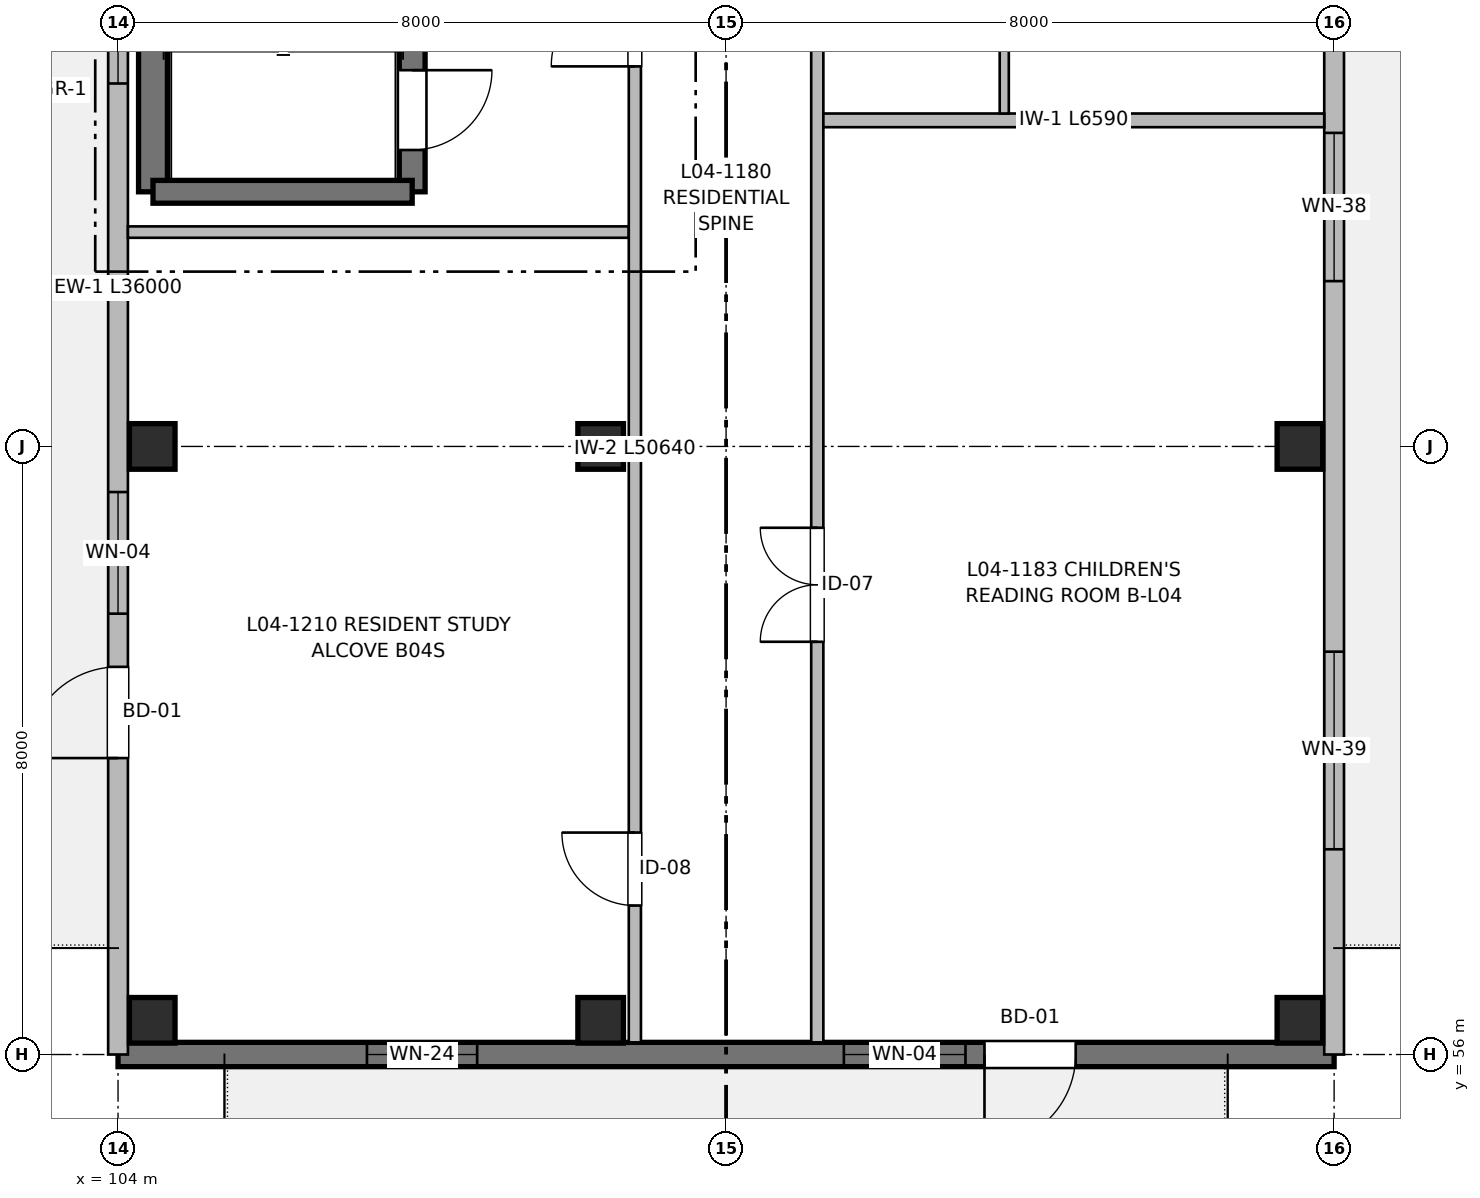
"""IFC4 building model, lengths in metres.
Left out: names, types, materials, properties, quantities, classifications, styles, units other than length and angle.
Written with IfcOpenShell. Run it as: python <this file> out.ifc"""

import sys

from ifc_helpers import new_model, si_unit, direction, frame, frame_2d, origin, origin_2d, place, context, subcontext, project, spatial, rectangle, extrude, element, fill, save


model = new_model("IFC4")
c1 = context("Model", 3, precision=1e-05, world=origin(), true_north=direction((0.0, 1.0)))
c2 = subcontext(c1, "Body", "Model", "MODEL_VIEW")
j1 = project(units=[si_unit("LENGTHUNIT", "METRE"), si_unit("PLANEANGLEUNIT", "RADIAN")], contexts=[c1])
p1 = place(None, origin())
s1 = spatial("IfcSite", under=j1, at=p1, CompositionType="ELEMENT")
p2 = place(p1, origin())
s2 = spatial("IfcBuilding", under=s1, at=p2, CompositionType="ELEMENT")
p3 = place(p2, frame((0.0, 0.0, 13.76)))
s3 = spatial("IfcBuildingStorey", under=s2, at=p3, CompositionType="ELEMENT", Elevation=13.76)
for number, where, z_axis, x_axis in (
    (1, (104.45, 56.45, 0.0), (0.0, 0.0, 1.0), (1.0, 0.0, 0.0)),
    (2, (104.45, 64.0, 0.0), (0.0, 0.0, 1.0), (1.0, 0.0, 0.0)),
    (3, (110.35, 56.45, 0.0), (0.0, 0.0, 1.0), (1.0, 0.0, 0.0)),
    (4, (110.35, 64.0, 0.0), (0.0, 0.0, 1.0), (1.0, 0.0, 0.0)),
    (5, (119.55, 56.45, 0.0), (0.0, 0.0, 1.0), (1.0, 0.0, 0.0)),
    (6, (119.55, 64.0, 0.0), (0.0, 0.0, 1.0), (1.0, 0.0, 0.0)),
):
    element("IfcColumn", number, at=place(p3, frame(where, z_axis=z_axis, x_axis=x_axis)), inside=s3, PredefinedType="COLUMN", context=c2, shape_type="SweptSolid", body=[
        extrude(rectangle(XDim=0.6, YDim=0.6, at=origin_2d()), origin(), (0.0, 0.0, 1.0), 3.2),
    ])
p4 = place(p3, frame((104.46, 67.35, 0.0), z_axis=(0.0, 0.0, 1.0), x_axis=(0.0, 1.0, 0.0)))
e7 = element("IfcWall", 7, at=p4, inside=s3, PredefinedType="SHEAR", context=c2, shape_type="SweptSolid", body=[
    extrude(rectangle(XDim=12.45, YDim=0.38, at=frame_2d((6.225, 0.0))), origin(), (0.0, 0.0, 1.0), 3.2),
])
p5 = place(p4, frame((2.2, 0.0, 0.97)))
e8 = element("IfcOpeningElement", 8, at=p5, cuts=e7, PredefinedType="OPENING", context=c2, shape_type="SweptSolid", body=[
    extrude(rectangle(XDim=0.95, YDim=1.25, at=frame_2d((0.475, 0.625))), frame((0.0, 0.2, 0.0), z_axis=(0.0, -1.0, 0.0), x_axis=(1.0, 0.0, 0.0)), (0.0, 0.0, 1.0), 0.4),
])
p6 = place(p3, frame((107.87, 79.8, 0.0), z_axis=(0.0, 0.0, 1.0), x_axis=(0.0, -1.0, 0.0)))
e9 = element("IfcWall", 9, at=p6, inside=s3, PredefinedType="SHEAR", context=c2, shape_type="SweptSolid", body=[
    extrude(rectangle(XDim=12.45, YDim=0.34, at=frame_2d((6.225, 0.0))), origin(), (0.0, 0.0, 1.0), 3.2),
])
p7 = place(p6, frame((10.85, 0.0, 0.0)))
e10 = element("IfcOpeningElement", 10, at=p7, cuts=e9, PredefinedType="OPENING", context=c2, shape_type="SweptSolid", body=[
    extrude(rectangle(XDim=1.05, YDim=2.15, at=frame_2d((0.525, 1.075))), frame((0.0, 0.18, 0.0), z_axis=(0.0, -1.0, 0.0), x_axis=(1.0, 0.0, 0.0)), (0.0, 0.0, 1.0), 0.36),
])
p8 = place(p3, frame((107.87, 67.35, 0.0), z_axis=(0.0, 0.0, 1.0), x_axis=(-1.0, 0.0, 0.0)))
e11 = element("IfcWall", 11, at=p8, inside=s3, PredefinedType="SHEAR", context=c2, shape_type="SweptSolid", body=[
    extrude(rectangle(XDim=3.41, YDim=0.3, at=frame_2d((1.705, 0.0))), origin(), (0.0, 0.0, 1.0), 3.2),
])
p9 = place(p3, frame((120.0, 56.0, 0.0), z_axis=(0.0, 0.0, 1.0), x_axis=(-1.0, 0.0, 0.0)))
e12 = element("IfcWall", 12, at=p9, inside=s3, PredefinedType="SHEAR", context=c2, shape_type="SweptSolid", body=[
    extrude(rectangle(XDim=16.0, YDim=0.32, at=frame_2d((8.0, 0.0))), origin(), (0.0, 0.0, 1.0), 2.98),
])
p10 = place(p9, frame((3.4, 0.0, 0.0)))
e13 = element("IfcOpeningElement", 13, at=p10, cuts=e12, PredefinedType="OPENING", context=c2, shape_type="SweptSolid", body=[
    extrude(rectangle(XDim=1.2, YDim=2.2, at=frame_2d((0.6, 1.1))), frame((0.0, 0.17, 0.0), z_axis=(0.0, -1.0, 0.0), x_axis=(1.0, 0.0, 0.0)), (0.0, 0.0, 1.0), 0.34),
])
p11 = place(p9, frame((4.85, 0.0, 0.77)))
e14 = element("IfcOpeningElement", 14, at=p11, cuts=e12, PredefinedType="OPENING", context=c2, shape_type="SweptSolid", body=[
    extrude(rectangle(XDim=1.6, YDim=1.45, at=frame_2d((0.8, 0.725))), frame((0.0, 0.17, 0.0), z_axis=(0.0, -1.0, 0.0), x_axis=(1.0, 0.0, 0.0)), (0.0, 0.0, 1.0), 0.34),
])
p12 = place(p9, frame((11.275, 0.0, 0.77)))
e15 = element("IfcOpeningElement", 15, at=p12, cuts=e12, PredefinedType="OPENING", context=c2, shape_type="SweptSolid", body=[
    extrude(rectangle(XDim=1.45, YDim=1.45, at=frame_2d((0.725, 0.725))), frame((0.0, 0.17, 0.0), z_axis=(0.0, -1.0, 0.0), x_axis=(1.0, 0.0, 0.0)), (0.0, 0.0, 1.0), 0.34),
])
p13 = place(p3, frame((120.0, 88.0, 0.0), z_axis=(0.0, 0.0, 1.0), x_axis=(0.0, -1.0, 0.0)))
e16 = element("IfcWall", 16, at=p13, inside=s3, PredefinedType="SOLIDWALL", context=c2, shape_type="SweptSolid", body=[
    extrude(rectangle(XDim=32.0, YDim=0.26, at=frame_2d((16.0, 0.0))), origin(), (0.0, 0.0, 1.0), 2.98),
])
p14 = place(p13, frame((3.4, 0.0, 0.0)))
e17 = element("IfcOpeningElement", 17, at=p14, cuts=e16, PredefinedType="OPENING", context=c2, shape_type="SweptSolid", body=[
    extrude(rectangle(XDim=1.2, YDim=2.2, at=frame_2d((0.6, 1.1))), frame((0.0, 0.14, 0.0), z_axis=(0.0, -1.0, 0.0), x_axis=(1.0, 0.0, 0.0)), (0.0, 0.0, 1.0), 0.28),
])
p15 = place(p13, frame((5.75, 0.0, 0.77)))
e18 = element("IfcOpeningElement", 18, at=p15, cuts=e16, PredefinedType="OPENING", context=c2, shape_type="SweptSolid", body=[
    extrude(rectangle(XDim=1.6, YDim=1.45, at=frame_2d((0.8, 0.725))), frame((0.0, 0.14, 0.0), z_axis=(0.0, -1.0, 0.0), x_axis=(1.0, 0.0, 0.0)), (0.0, 0.0, 1.0), 0.28),
])
p16 = place(p13, frame((11.275, 0.0, 0.77)))
e19 = element("IfcOpeningElement", 19, at=p16, cuts=e16, PredefinedType="OPENING", context=c2, shape_type="SweptSolid", body=[
    extrude(rectangle(XDim=1.45, YDim=1.45, at=frame_2d((0.725, 0.725))), frame((0.0, 0.14, 0.0), z_axis=(0.0, -1.0, 0.0), x_axis=(1.0, 0.0, 0.0)), (0.0, 0.0, 1.0), 0.28),
])
p17 = place(p13, frame((19.875, 0.0, 0.72)))
e20 = element("IfcOpeningElement", 20, at=p17, cuts=e16, PredefinedType="OPENING", context=c2, shape_type="SweptSolid", body=[
    extrude(rectangle(XDim=1.95, YDim=1.5, at=frame_2d((0.975, 0.75))), frame((0.0, 0.14, 0.0), z_axis=(0.0, -1.0, 0.0), x_axis=(1.0, 0.0, 0.0)), (0.0, 0.0, 1.0), 0.28),
])
p18 = place(p13, frame((26.7, 0.0, 0.67)))
e21 = element("IfcOpeningElement", 21, at=p18, cuts=e16, PredefinedType="OPENING", context=c2, shape_type="SweptSolid", body=[
    extrude(rectangle(XDim=2.6, YDim=1.55, at=frame_2d((1.3, 0.775))), frame((0.0, 0.14, 0.0), z_axis=(0.0, -1.0, 0.0), x_axis=(1.0, 0.0, 0.0)), (0.0, 0.0, 1.0), 0.28),
])
p19 = place(p13, frame((16.73, 0.0, 0.82)))
e22 = element("IfcOpeningElement", 22, at=p19, cuts=e16, PredefinedType="OPENING", context=c2, shape_type="SweptSolid", body=[
    extrude(rectangle(XDim=1.5, YDim=1.4, at=frame_2d((0.75, 0.7))), frame((0.0, 0.14, 0.0), z_axis=(0.0, -1.0, 0.0), x_axis=(1.0, 0.0, 0.0)), (0.0, 0.0, 1.0), 0.28),
])
p20 = place(p13, frame((0.46, 0.0, 0.9)))
e23 = element("IfcOpeningElement", 23, at=p20, cuts=e16, PredefinedType="OPENING", context=c2, shape_type="SweptSolid", body=[
    extrude(rectangle(XDim=0.65, YDim=0.95, at=frame_2d((0.325, 0.475))), frame((0.0, 0.14, 0.0), z_axis=(0.0, -1.0, 0.0), x_axis=(1.0, 0.0, 0.0)), (0.0, 0.0, 1.0), 0.28),
])
p21 = place(p3, frame((104.0, 56.0, 0.0), z_axis=(0.0, 0.0, 1.0), x_axis=(0.0, 1.0, 0.0)))
e24 = element("IfcWall", 24, at=p21, inside=s3, PredefinedType="SOLIDWALL", context=c2, shape_type="SweptSolid", body=[
    extrude(rectangle(XDim=36.0, YDim=0.26, at=frame_2d((18.0, 0.0))), origin(), (0.0, 0.0, 1.0), 2.98),
])
p22 = place(p21, frame((3.9, 0.0, 0.0)))
e25 = element("IfcOpeningElement", 25, at=p22, cuts=e24, PredefinedType="OPENING", context=c2, shape_type="SweptSolid", body=[
    extrude(rectangle(XDim=1.2, YDim=2.2, at=frame_2d((0.6, 1.1))), frame((0.0, 0.14, 0.0), z_axis=(0.0, -1.0, 0.0), x_axis=(1.0, 0.0, 0.0)), (0.0, 0.0, 1.0), 0.28),
])
p23 = place(p21, frame((5.8, 0.0, 0.77)))
e26 = element("IfcOpeningElement", 26, at=p23, cuts=e24, PredefinedType="OPENING", context=c2, shape_type="SweptSolid", body=[
    extrude(rectangle(XDim=1.6, YDim=1.45, at=frame_2d((0.8, 0.725))), frame((0.0, 0.14, 0.0), z_axis=(0.0, -1.0, 0.0), x_axis=(1.0, 0.0, 0.0)), (0.0, 0.0, 1.0), 0.28),
])
p24 = place(p21, frame((12.775, 0.0, 0.77)))
e27 = element("IfcOpeningElement", 27, at=p24, cuts=e24, PredefinedType="OPENING", context=c2, shape_type="SweptSolid", body=[
    extrude(rectangle(XDim=1.45, YDim=1.45, at=frame_2d((0.725, 0.725))), frame((0.0, 0.14, 0.0), z_axis=(0.0, -1.0, 0.0), x_axis=(1.0, 0.0, 0.0)), (0.0, 0.0, 1.0), 0.28),
])
p25 = place(p21, frame((19.175, 0.0, 0.72)))
e28 = element("IfcOpeningElement", 28, at=p25, cuts=e24, PredefinedType="OPENING", context=c2, shape_type="SweptSolid", body=[
    extrude(rectangle(XDim=1.95, YDim=1.5, at=frame_2d((0.975, 0.75))), frame((0.0, 0.14, 0.0), z_axis=(0.0, -1.0, 0.0), x_axis=(1.0, 0.0, 0.0)), (0.0, 0.0, 1.0), 0.28),
])
p26 = place(p21, frame((30.2, 0.0, 0.67)))
e29 = element("IfcOpeningElement", 29, at=p26, cuts=e24, PredefinedType="OPENING", context=c2, shape_type="SweptSolid", body=[
    extrude(rectangle(XDim=2.6, YDim=1.55, at=frame_2d((1.3, 0.775))), frame((0.0, 0.14, 0.0), z_axis=(0.0, -1.0, 0.0), x_axis=(1.0, 0.0, 0.0)), (0.0, 0.0, 1.0), 0.28),
])
p27 = place(p3, frame((104.13, 66.82, 0.0), z_axis=(0.0, 0.0, 1.0), x_axis=(1.0, 0.0, 0.0)))
e30 = element("IfcWall", 30, at=p27, inside=s3, PredefinedType="PARTITIONING", context=c2, shape_type="SweptSolid", body=[
    extrude(rectangle(XDim=6.59, YDim=0.15, at=frame_2d((3.295, 0.0))), origin(), (0.0, 0.0, 1.0), 2.935),
])
p28 = place(p3, frame((110.8, 56.16, 0.0), z_axis=(0.0, 0.0, 1.0), x_axis=(0.0, 1.0, 0.0)))
e31 = element("IfcWall", 31, at=p28, inside=s3, PredefinedType="PARTITIONING", context=c2, shape_type="SweptSolid", body=[
    extrude(rectangle(XDim=50.64, YDim=0.16, at=frame_2d((25.32, 0.0))), origin(), (0.0, 0.0, 1.0), 2.935),
])
p29 = place(p28, frame((12.84, 0.0, 0.0)))
e32 = element("IfcOpeningElement", 32, at=p29, cuts=e31, PredefinedType="OPENING", context=c2, shape_type="SweptSolid", body=[
    extrude(rectangle(XDim=1.1, YDim=2.15, at=frame_2d((0.55, 1.075))), frame((0.0, 0.09, 0.0), z_axis=(0.0, -1.0, 0.0), x_axis=(1.0, 0.0, 0.0)), (0.0, 0.0, 1.0), 0.18),
])
p30 = place(p28, frame((19.24, 0.0, 0.0)))
e33 = element("IfcOpeningElement", 33, at=p30, cuts=e31, PredefinedType="OPENING", context=c2, shape_type="SweptSolid", body=[
    extrude(rectangle(XDim=1.6, YDim=2.15, at=frame_2d((0.8, 1.075))), frame((0.0, 0.09, 0.0), z_axis=(0.0, -1.0, 0.0), x_axis=(1.0, 0.0, 0.0)), (0.0, 0.0, 1.0), 0.18),
])
p31 = place(p28, frame((1.8, 0.0, 0.0)))
e34 = element("IfcOpeningElement", 34, at=p31, cuts=e31, PredefinedType="OPENING", context=c2, shape_type="SweptSolid", body=[
    extrude(rectangle(XDim=0.96, YDim=2.15, at=frame_2d((0.48, 1.075))), frame((0.0, 0.09, 0.0), z_axis=(0.0, -1.0, 0.0), x_axis=(1.0, 0.0, 0.0)), (0.0, 0.0, 1.0), 0.18),
])
p32 = place(p28, frame((32.745, 0.0, 0.0)))
e35 = element("IfcOpeningElement", 35, at=p32, cuts=e31, PredefinedType="OPENING", context=c2, shape_type="SweptSolid", body=[
    extrude(rectangle(XDim=0.98, YDim=2.15, at=frame_2d((0.49, 1.075))), frame((0.0, 0.09, 0.0), z_axis=(0.0, -1.0, 0.0), x_axis=(1.0, 0.0, 0.0)), (0.0, 0.0, 1.0), 0.18),
])
p33 = place(p28, frame((40.955, 0.0, 0.0)))
e36 = element("IfcOpeningElement", 36, at=p33, cuts=e31, PredefinedType="OPENING", context=c2, shape_type="SweptSolid", body=[
    extrude(rectangle(XDim=0.98, YDim=2.15, at=frame_2d((0.49, 1.075))), frame((0.0, 0.09, 0.0), z_axis=(0.0, -1.0, 0.0), x_axis=(1.0, 0.0, 0.0)), (0.0, 0.0, 1.0), 0.18),
])
p34 = place(p3, frame((113.2, 56.16, 0.0), z_axis=(0.0, 0.0, 1.0), x_axis=(0.0, 1.0, 0.0)))
e37 = element("IfcWall", 37, at=p34, inside=s3, PredefinedType="PARTITIONING", context=c2, shape_type="SweptSolid", body=[
    extrude(rectangle(XDim=50.64, YDim=0.16, at=frame_2d((25.32, 0.0))), origin(), (0.0, 0.0, 1.0), 2.935),
])
p35 = place(p34, frame((5.27, 0.0, 0.0)))
e38 = element("IfcOpeningElement", 38, at=p35, cuts=e37, PredefinedType="OPENING", context=c2, shape_type="SweptSolid", body=[
    extrude(rectangle(XDim=1.5, YDim=2.2, at=frame_2d((0.75, 1.1))), frame((0.0, 0.09, 0.0), z_axis=(0.0, -1.0, 0.0), x_axis=(1.0, 0.0, 0.0)), (0.0, 0.0, 1.0), 0.18),
])
p36 = place(p34, frame((19.4, 0.0, 0.0)))
e39 = element("IfcOpeningElement", 39, at=p36, cuts=e37, PredefinedType="OPENING", context=c2, shape_type="SweptSolid", body=[
    extrude(rectangle(XDim=0.98, YDim=2.15, at=frame_2d((0.49, 1.075))), frame((0.0, 0.09, 0.0), z_axis=(0.0, -1.0, 0.0), x_axis=(1.0, 0.0, 0.0)), (0.0, 0.0, 1.0), 0.18),
])
p37 = place(p34, frame((33.1, 0.0, 0.0)))
e40 = element("IfcOpeningElement", 40, at=p37, cuts=e37, PredefinedType="OPENING", context=c2, shape_type="SweptSolid", body=[
    extrude(rectangle(XDim=0.98, YDim=2.15, at=frame_2d((0.49, 1.075))), frame((0.0, 0.09, 0.0), z_axis=(0.0, -1.0, 0.0), x_axis=(1.0, 0.0, 0.0)), (0.0, 0.0, 1.0), 0.18),
])
p38 = place(p34, frame((45.35, 0.0, 0.0)))
e41 = element("IfcOpeningElement", 41, at=p38, cuts=e37, PredefinedType="OPENING", context=c2, shape_type="SweptSolid", body=[
    extrude(rectangle(XDim=0.98, YDim=2.15, at=frame_2d((0.49, 1.075))), frame((0.0, 0.09, 0.0), z_axis=(0.0, -1.0, 0.0), x_axis=(1.0, 0.0, 0.0)), (0.0, 0.0, 1.0), 0.18),
])
p39 = place(p3, frame((113.28, 68.29, 0.0), z_axis=(0.0, 0.0, 1.0), x_axis=(1.0, 0.0, 0.0)))
e42 = element("IfcWall", 42, at=p39, inside=s3, PredefinedType="PARTITIONING", context=c2, shape_type="SweptSolid", body=[
    extrude(rectangle(XDim=6.59, YDim=0.18, at=frame_2d((3.295, 0.0))), origin(), (0.0, 0.0, 1.0), 2.935),
])
p40 = place(p3, frame((115.66, 68.38, 0.0), z_axis=(0.0, 0.0, 1.0), x_axis=(0.0, 1.0, 0.0)))
e43 = element("IfcWall", 43, at=p40, inside=s3, PredefinedType="PARTITIONING", context=c2, shape_type="SweptSolid", body=[
    extrude(rectangle(XDim=13.98, YDim=0.12, at=frame_2d((6.99, 0.0))), origin(), (0.0, 0.0, 1.0), 2.935),
])
p41 = place(p40, frame((2.443, 0.0, 0.0)))
e44 = element("IfcOpeningElement", 44, at=p41, cuts=e43, PredefinedType="OPENING", context=c2, shape_type="SweptSolid", body=[
    extrude(rectangle(XDim=0.86, YDim=2.1, at=frame_2d((0.43, 1.05))), frame((0.0, 0.07, 0.0), z_axis=(0.0, -1.0, 0.0), x_axis=(1.0, 0.0, 0.0)), (0.0, 0.0, 1.0), 0.14),
])
p42 = place(p40, frame((8.544, 0.0, 0.0)))
e45 = element("IfcOpeningElement", 45, at=p42, cuts=e43, PredefinedType="OPENING", context=c2, shape_type="SweptSolid", body=[
    extrude(rectangle(XDim=0.92, YDim=2.1, at=frame_2d((0.46, 1.05))), frame((0.0, 0.07, 0.0), z_axis=(0.0, -1.0, 0.0), x_axis=(1.0, 0.0, 0.0)), (0.0, 0.0, 1.0), 0.14),
])
p43 = place(p7, origin())
e46 = element("IfcDoor", 46, at=p43, inside=s3, OperationType="SINGLE_SWING_LEFT", PredefinedType="DOOR", context=c2, shape_type="SweptSolid", body=[
    extrude(rectangle(XDim=1.05, YDim=2.15, at=frame_2d((0.525, 1.075))), frame((0.0, 0.025, 0.0), z_axis=(0.0, -1.0, 0.0), x_axis=(1.0, 0.0, 0.0)), (0.0, 0.0, 1.0), 0.05),
])
fill(e10, e46)
p44 = place(p10, origin())
e47 = element("IfcDoor", 47, at=p44, inside=s3, OperationType="SINGLE_SWING_RIGHT", PredefinedType="DOOR", context=c2, shape_type="SweptSolid", body=[
    extrude(rectangle(XDim=1.2, YDim=2.2, at=frame_2d((0.6, 1.1))), frame((0.0, 0.025, 0.0), z_axis=(0.0, -1.0, 0.0), x_axis=(1.0, 0.0, 0.0)), (0.0, 0.0, 1.0), 0.05),
])
fill(e13, e47)
p45 = place(p11, origin())
e48 = element("IfcWindow", 48, at=p45, inside=s3, PartitioningType="SINGLE_PANEL", PredefinedType="WINDOW", context=c2, shape_type="SweptSolid", body=[
    extrude(rectangle(XDim=1.6, YDim=1.45, at=frame_2d((0.8, 0.725))), frame((0.0, 0.03, 0.0), z_axis=(0.0, -1.0, 0.0), x_axis=(1.0, 0.0, 0.0)), (0.0, 0.0, 1.0), 0.06),
])
fill(e14, e48)
p46 = place(p12, origin())
e49 = element("IfcWindow", 49, at=p46, inside=s3, PartitioningType="SINGLE_PANEL", PredefinedType="WINDOW", context=c2, shape_type="SweptSolid", body=[
    extrude(rectangle(XDim=1.45, YDim=1.45, at=frame_2d((0.725, 0.725))), frame((0.0, 0.03, 0.0), z_axis=(0.0, -1.0, 0.0), x_axis=(1.0, 0.0, 0.0)), (0.0, 0.0, 1.0), 0.06),
])
fill(e15, e49)
p47 = place(p17, origin())
e50 = element("IfcWindow", 50, at=p47, inside=s3, PartitioningType="SINGLE_PANEL", PredefinedType="WINDOW", context=c2, shape_type="SweptSolid", body=[
    extrude(rectangle(XDim=1.95, YDim=1.5, at=frame_2d((0.975, 0.75))), frame((0.0, 0.03, 0.0), z_axis=(0.0, -1.0, 0.0), x_axis=(1.0, 0.0, 0.0)), (0.0, 0.0, 1.0), 0.06),
])
fill(e20, e50)
p48 = place(p18, origin())
e51 = element("IfcWindow", 51, at=p48, inside=s3, PartitioningType="SINGLE_PANEL", PredefinedType="WINDOW", context=c2, shape_type="SweptSolid", body=[
    extrude(rectangle(XDim=2.6, YDim=1.55, at=frame_2d((1.3, 0.775))), frame((0.0, 0.03, 0.0), z_axis=(0.0, -1.0, 0.0), x_axis=(1.0, 0.0, 0.0)), (0.0, 0.0, 1.0), 0.06),
])
fill(e21, e51)
p49 = place(p22, origin())
e52 = element("IfcDoor", 52, at=p49, inside=s3, OperationType="SINGLE_SWING_LEFT", PredefinedType="DOOR", context=c2, shape_type="SweptSolid", body=[
    extrude(rectangle(XDim=1.2, YDim=2.2, at=frame_2d((0.6, 1.1))), frame((0.0, 0.025, 0.0), z_axis=(0.0, -1.0, 0.0), x_axis=(1.0, 0.0, 0.0)), (0.0, 0.0, 1.0), 0.05),
])
fill(e25, e52)
p50 = place(p23, origin())
e53 = element("IfcWindow", 53, at=p50, inside=s3, PartitioningType="SINGLE_PANEL", PredefinedType="WINDOW", context=c2, shape_type="SweptSolid", body=[
    extrude(rectangle(XDim=1.6, YDim=1.45, at=frame_2d((0.8, 0.725))), frame((0.0, 0.03, 0.0), z_axis=(0.0, -1.0, 0.0), x_axis=(1.0, 0.0, 0.0)), (0.0, 0.0, 1.0), 0.06),
])
fill(e26, e53)
p51 = place(p24, origin())
e54 = element("IfcWindow", 54, at=p51, inside=s3, PartitioningType="SINGLE_PANEL", PredefinedType="WINDOW", context=c2, shape_type="SweptSolid", body=[
    extrude(rectangle(XDim=1.45, YDim=1.45, at=frame_2d((0.725, 0.725))), frame((0.0, 0.03, 0.0), z_axis=(0.0, -1.0, 0.0), x_axis=(1.0, 0.0, 0.0)), (0.0, 0.0, 1.0), 0.06),
])
fill(e27, e54)
p52 = place(p29, origin())
e55 = element("IfcDoor", 55, at=p52, inside=s3, OperationType="SINGLE_SWING_LEFT", PredefinedType="DOOR", context=c2, shape_type="SweptSolid", body=[
    extrude(rectangle(XDim=1.1, YDim=2.15, at=frame_2d((0.55, 1.075))), frame((0.0, 0.025, 0.0), z_axis=(0.0, -1.0, 0.0), x_axis=(1.0, 0.0, 0.0)), (0.0, 0.0, 1.0), 0.05),
])
fill(e32, e55)
p53 = place(p35, origin())
e56 = element("IfcDoor", 56, at=p53, inside=s3, OperationType="DOUBLE_DOOR_SINGLE_SWING", PredefinedType="DOOR", context=c2, shape_type="SweptSolid", body=[
    extrude(rectangle(XDim=1.5, YDim=2.2, at=frame_2d((0.75, 1.1))), frame((0.0, 0.025, 0.0), z_axis=(0.0, -1.0, 0.0), x_axis=(1.0, 0.0, 0.0)), (0.0, 0.0, 1.0), 0.05),
])
fill(e38, e56)
p54 = place(p31, origin())
e57 = element("IfcDoor", 57, at=p54, inside=s3, OperationType="SINGLE_SWING_RIGHT", PredefinedType="DOOR", context=c2, shape_type="SweptSolid", body=[
    extrude(rectangle(XDim=0.96, YDim=2.15, at=frame_2d((0.48, 1.075))), frame((0.0, 0.025, 0.0), z_axis=(0.0, -1.0, 0.0), x_axis=(1.0, 0.0, 0.0)), (0.0, 0.0, 1.0), 0.05),
])
fill(e34, e57)
save(model, sys.argv[1])
